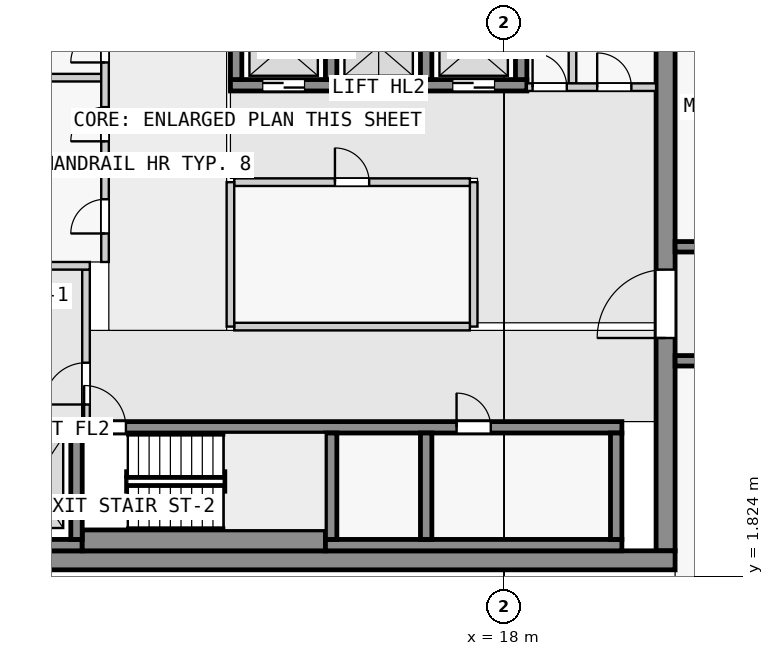
"""IFC4 building model, lengths in metres.
Left out: names, types, materials, properties, quantities, classifications, styles, units other than length and angle.
Written with IfcOpenShell. Run it as: python <this file> out.ifc"""

import sys

from ifc_helpers import new_model, si_unit, direction, frame, frame_2d, origin, place, context, subcontext, project, spatial, rectangle, extrude, element, fill, save


model = new_model("IFC4")
c1 = context("Model", 3, precision=1e-05, world=origin(), true_north=direction((0.0, 1.0)))
c2 = subcontext(c1, "Body", "Model", "MODEL_VIEW")
j1 = project(units=[si_unit("LENGTHUNIT", "METRE"), si_unit("PLANEANGLEUNIT", "RADIAN")], contexts=[c1])
p1 = place(None, origin())
s1 = spatial("IfcSite", under=j1, at=p1, CompositionType="ELEMENT")
p2 = place(p1, origin())
s2 = spatial("IfcBuilding", under=s1, at=p2, CompositionType="ELEMENT")
p3 = place(p2, frame((0.0, 0.0, 222.4)))
s3 = spatial("IfcBuildingStorey", under=s2, at=p3, CompositionType="ELEMENT", Elevation=222.4)
p4 = place(p3, frame((1.8, 2.25, 0.0), z_axis=(0.0, 0.0, 1.0), x_axis=(1.0, 0.0, 0.0)))
e1 = element("IfcWall", 1, at=p4, inside=s3, PredefinedType="SHEAR", context=c2, shape_type="SweptSolid", body=[
    extrude(rectangle(XDim=20.7, YDim=0.5, at=frame_2d((10.35, 0.0))), origin(), (0.0, 0.0, 1.0), 3.25),
])
p5 = place(p3, frame((22.25, 2.5, 0.0), z_axis=(0.0, 0.0, 1.0), x_axis=(0.0, 1.0, 0.0)))
e2 = element("IfcWall", 2, at=p5, inside=s3, PredefinedType="SHEAR", context=c2, shape_type="SweptSolid", body=[
    extrude(rectangle(XDim=15.0, YDim=0.5, at=frame_2d((7.5, 0.0))), origin(), (0.0, 0.0, 1.0), 3.25),
])
p6 = place(p5, frame((5.6, 0.0, 0.0)))
e3 = element("IfcOpeningElement", 3, at=p6, cuts=e2, PredefinedType="OPENING", context=c2, shape_type="SweptSolid", body=[
    extrude(rectangle(XDim=1.8, YDim=2.1, at=frame_2d((0.9, 1.05))), frame((0.0, 0.26, 0.0), z_axis=(0.0, -1.0, 0.0), x_axis=(1.0, 0.0, 0.0)), (0.0, 0.0, 1.0), 0.52),
])
p7 = place(p3, frame((2.3, 2.65, 0.0), z_axis=(0.0, 0.0, 1.0), x_axis=(1.0, 0.0, 0.0)))
e4 = element("IfcWall", 4, at=p7, inside=s3, PredefinedType="SHEAR", context=c2, shape_type="SweptSolid", body=[
    extrude(rectangle(XDim=4.6, YDim=0.3, at=frame_2d((2.3, 0.0))), origin(), (0.0, 0.0, 1.0), 3.25),
])
p8 = place(p3, frame((6.9, 2.775, 0.0), z_axis=(0.0, 0.0, 1.0), x_axis=(1.0, 0.0, 0.0)))
e5 = element("IfcWall", 5, at=p8, inside=s3, PredefinedType="SHEAR", context=c2, shape_type="SweptSolid", body=[
    extrude(rectangle(XDim=6.4, YDim=0.55, at=frame_2d((3.2, 0.0))), origin(), (0.0, 0.0, 1.0), 3.25),
])
p9 = place(p3, frame((13.3, 2.65, 0.0), z_axis=(0.0, 0.0, 1.0), x_axis=(1.0, 0.0, 0.0)))
e6 = element("IfcWall", 6, at=p9, inside=s3, PredefinedType="SHEAR", context=c2, shape_type="SweptSolid", body=[
    extrude(rectangle(XDim=7.8, YDim=0.3, at=frame_2d((3.9, 0.0))), origin(), (0.0, 0.0, 1.0), 3.25),
])
for number, where, z_axis, x_axis in (
    (7, (6.75, 2.8, 0.0), (0.0, 0.0, 1.0), (0.0, 1.0, 0.0)),
    (8, (13.45, 2.8, 0.0), (0.0, 0.0, 1.0), (0.0, 1.0, 0.0)),
    (9, (20.95, 2.8, 0.0), (0.0, 0.0, 1.0), (0.0, 1.0, 0.0)),
):
    element("IfcWall", number, at=place(p3, frame(where, z_axis=z_axis, x_axis=x_axis)), inside=s3, PredefinedType="SHEAR", context=c2, shape_type="SweptSolid", body=[
        extrude(rectangle(XDim=2.8, YDim=0.3, at=frame_2d((1.4, 0.0))), origin(), (0.0, 0.0, 1.0), 3.25),
    ])
p10 = place(p3, frame((2.3, 5.75, 0.0), z_axis=(0.0, 0.0, 1.0), x_axis=(1.0, 0.0, 0.0)))
e10 = element("IfcWall", 10, at=p10, inside=s3, PredefinedType="SHEAR", context=c2, shape_type="SweptSolid", body=[
    extrude(rectangle(XDim=18.8, YDim=0.3, at=frame_2d((9.4, 0.0))), origin(), (0.0, 0.0, 1.0), 3.25),
])
p11 = place(p10, frame((4.65, 0.0, 0.0)))
e11 = element("IfcOpeningElement", 11, at=p11, cuts=e10, PredefinedType="OPENING", context=c2, shape_type="SweptSolid", body=[
    extrude(rectangle(XDim=1.1, YDim=2.1, at=frame_2d((0.55, 1.05))), frame((0.0, 0.16, 0.0), z_axis=(0.0, -1.0, 0.0), x_axis=(1.0, 0.0, 0.0)), (0.0, 0.0, 1.0), 0.32),
])
p12 = place(p10, frame((0.45, 0.0, 0.0)))
e12 = element("IfcOpeningElement", 12, at=p12, cuts=e10, PredefinedType="OPENING", context=c2, shape_type="SweptSolid", body=[
    extrude(rectangle(XDim=1.1, YDim=2.1, at=frame_2d((0.55, 1.05))), frame((0.0, 0.16, 0.0), z_axis=(0.0, -1.0, 0.0), x_axis=(1.0, 0.0, 0.0)), (0.0, 0.0, 1.0), 0.32),
])
p13 = place(p10, frame((2.75, 0.0, 0.0)))
e13 = element("IfcOpeningElement", 13, at=p13, cuts=e10, PredefinedType="OPENING", context=c2, shape_type="SweptSolid", body=[
    extrude(rectangle(XDim=1.1, YDim=2.1, at=frame_2d((0.55, 1.05))), frame((0.0, 0.16, 0.0), z_axis=(0.0, -1.0, 0.0), x_axis=(1.0, 0.0, 0.0)), (0.0, 0.0, 1.0), 0.32),
])
p14 = place(p10, frame((14.45, 0.0, 0.0)))
e14 = element("IfcOpeningElement", 14, at=p14, cuts=e10, PredefinedType="OPENING", context=c2, shape_type="SweptSolid", body=[
    extrude(rectangle(XDim=0.9, YDim=2.1, at=frame_2d((0.45, 1.05))), frame((0.0, 0.16, 0.0), z_axis=(0.0, -1.0, 0.0), x_axis=(1.0, 0.0, 0.0)), (0.0, 0.0, 1.0), 0.32),
])
p15 = place(p3, frame((10.8, 14.75, 0.0), z_axis=(0.0, 0.0, 1.0), x_axis=(1.0, 0.0, 0.0)))
e15 = element("IfcWall", 15, at=p15, inside=s3, PredefinedType="SHEAR", context=c2, shape_type="SweptSolid", body=[
    extrude(rectangle(XDim=7.8, YDim=0.3, at=frame_2d((3.9, 0.0))), origin(), (0.0, 0.0, 1.0), 3.25),
])
p16 = place(p15, frame((0.85, 0.0, 0.0)))
e16 = element("IfcOpeningElement", 16, at=p16, cuts=e15, PredefinedType="OPENING", context=c2, shape_type="SweptSolid", body=[
    extrude(rectangle(XDim=1.1, YDim=2.1, at=frame_2d((0.55, 1.05))), frame((0.0, 0.16, 0.0), z_axis=(0.0, -1.0, 0.0), x_axis=(1.0, 0.0, 0.0)), (0.0, 0.0, 1.0), 0.32),
])
p17 = place(p15, frame((3.35, 0.0, 0.0)))
e17 = element("IfcOpeningElement", 17, at=p17, cuts=e15, PredefinedType="OPENING", context=c2, shape_type="SweptSolid", body=[
    extrude(rectangle(XDim=1.1, YDim=2.1, at=frame_2d((0.55, 1.05))), frame((0.0, 0.16, 0.0), z_axis=(0.0, -1.0, 0.0), x_axis=(1.0, 0.0, 0.0)), (0.0, 0.0, 1.0), 0.32),
])
p18 = place(p15, frame((5.85, 0.0, 0.0)))
e18 = element("IfcOpeningElement", 18, at=p18, cuts=e15, PredefinedType="OPENING", context=c2, shape_type="SweptSolid", body=[
    extrude(rectangle(XDim=1.1, YDim=2.1, at=frame_2d((0.55, 1.05))), frame((0.0, 0.16, 0.0), z_axis=(0.0, -1.0, 0.0), x_axis=(1.0, 0.0, 0.0)), (0.0, 0.0, 1.0), 0.32),
])
for number, where, z_axis, x_axis in (
    (19, (10.95, 14.9, 0.0), (0.0, 0.0, 1.0), (0.0, 1.0, 0.0)),
    (20, (13.45, 14.9, 0.0), (0.0, 0.0, 1.0), (0.0, 1.0, 0.0)),
    (21, (15.95, 14.9, 0.0), (0.0, 0.0, 1.0), (0.0, 1.0, 0.0)),
    (22, (18.45, 14.9, 0.0), (0.0, 0.0, 1.0), (0.0, 1.0, 0.0)),
):
    element("IfcWall", number, at=place(p3, frame(where, z_axis=z_axis, x_axis=x_axis)), inside=s3, PredefinedType="SHEAR", context=c2, shape_type="SweptSolid", body=[
        extrude(rectangle(XDim=2.0, YDim=0.3, at=frame_2d((1.0, 0.0))), origin(), (0.0, 0.0, 1.0), 3.25),
    ])
p19 = place(p3, frame((22.5, 7.5, 0.0), z_axis=(0.0, 0.0, 1.0), x_axis=(1.0, 0.0, 0.0)))
e23 = element("IfcWall", 23, at=p19, inside=s3, PredefinedType="SHEAR", context=c2, shape_type="SweptSolid", body=[
    extrude(rectangle(XDim=22.5, YDim=0.275, at=frame_2d((11.25, 0.0))), origin(), (0.0, 0.0, 1.0), 3.25),
])
p20 = place(p19, frame((1.75, 0.0, 0.0)))
e24 = element("IfcOpeningElement", 24, at=p20, cuts=e23, PredefinedType="OPENING", context=c2, shape_type="SweptSolid", body=[
    extrude(rectangle(XDim=1.0, YDim=2.1, at=frame_2d((0.5, 1.05))), frame((0.0, 0.147, 0.0), z_axis=(0.0, -1.0, 0.0), x_axis=(1.0, 0.0, 0.0)), (0.0, 0.0, 1.0), 0.295),
])
p21 = place(p19, frame((6.25, 0.0, 0.0)))
e25 = element("IfcOpeningElement", 25, at=p21, cuts=e23, PredefinedType="OPENING", context=c2, shape_type="SweptSolid", body=[
    extrude(rectangle(XDim=1.0, YDim=2.1, at=frame_2d((0.5, 1.05))), frame((0.0, 0.147, 0.0), z_axis=(0.0, -1.0, 0.0), x_axis=(1.0, 0.0, 0.0)), (0.0, 0.0, 1.0), 0.295),
])
p22 = place(p19, frame((10.75, 0.0, 0.0)))
e26 = element("IfcOpeningElement", 26, at=p22, cuts=e23, PredefinedType="OPENING", context=c2, shape_type="SweptSolid", body=[
    extrude(rectangle(XDim=1.0, YDim=2.1, at=frame_2d((0.5, 1.05))), frame((0.0, 0.147, 0.0), z_axis=(0.0, -1.0, 0.0), x_axis=(1.0, 0.0, 0.0)), (0.0, 0.0, 1.0), 0.295),
])
p23 = place(p19, frame((16.85, 0.0, 0.0)))
e27 = element("IfcOpeningElement", 27, at=p23, cuts=e23, PredefinedType="OPENING", context=c2, shape_type="SweptSolid", body=[
    extrude(rectangle(XDim=1.0, YDim=2.1, at=frame_2d((0.5, 1.05))), frame((0.0, 0.147, 0.0), z_axis=(0.0, -1.0, 0.0), x_axis=(1.0, 0.0, 0.0)), (0.0, 0.0, 1.0), 0.295),
])
p24 = place(p3, frame((22.5, 10.5, 0.0), z_axis=(0.0, 0.0, 1.0), x_axis=(1.0, 0.0, 0.0)))
e28 = element("IfcWall", 28, at=p24, inside=s3, PredefinedType="SHEAR", context=c2, shape_type="SweptSolid", body=[
    extrude(rectangle(XDim=22.5, YDim=0.275, at=frame_2d((11.25, 0.0))), origin(), (0.0, 0.0, 1.0), 3.25),
])
p25 = place(p24, frame((1.75, 0.0, 0.0)))
e29 = element("IfcOpeningElement", 29, at=p25, cuts=e28, PredefinedType="OPENING", context=c2, shape_type="SweptSolid", body=[
    extrude(rectangle(XDim=1.0, YDim=2.1, at=frame_2d((0.5, 1.05))), frame((0.0, 0.147, 0.0), z_axis=(0.0, -1.0, 0.0), x_axis=(1.0, 0.0, 0.0)), (0.0, 0.0, 1.0), 0.295),
])
p26 = place(p24, frame((6.25, 0.0, 0.0)))
e30 = element("IfcOpeningElement", 30, at=p26, cuts=e28, PredefinedType="OPENING", context=c2, shape_type="SweptSolid", body=[
    extrude(rectangle(XDim=1.0, YDim=2.1, at=frame_2d((0.5, 1.05))), frame((0.0, 0.147, 0.0), z_axis=(0.0, -1.0, 0.0), x_axis=(1.0, 0.0, 0.0)), (0.0, 0.0, 1.0), 0.295),
])
p27 = place(p24, frame((10.35, 0.0, 0.0)))
e31 = element("IfcOpeningElement", 31, at=p27, cuts=e28, PredefinedType="OPENING", context=c2, shape_type="SweptSolid", body=[
    extrude(rectangle(XDim=1.8, YDim=2.1, at=frame_2d((0.9, 1.05))), frame((0.0, 0.147, 0.0), z_axis=(0.0, -1.0, 0.0), x_axis=(1.0, 0.0, 0.0)), (0.0, 0.0, 1.0), 0.295),
])
p28 = place(p24, frame((15.25, 0.0, 0.0)))
e32 = element("IfcOpeningElement", 32, at=p28, cuts=e28, PredefinedType="OPENING", context=c2, shape_type="SweptSolid", body=[
    extrude(rectangle(XDim=1.0, YDim=2.1, at=frame_2d((0.5, 1.05))), frame((0.0, 0.147, 0.0), z_axis=(0.0, -1.0, 0.0), x_axis=(1.0, 0.0, 0.0)), (0.0, 0.0, 1.0), 0.295),
])
p29 = place(p24, frame((18.75, 0.0, 0.0)))
e33 = element("IfcOpeningElement", 33, at=p29, cuts=e28, PredefinedType="OPENING", context=c2, shape_type="SweptSolid", body=[
    extrude(rectangle(XDim=0.9, YDim=2.1, at=frame_2d((0.45, 1.05))), frame((0.0, 0.147, 0.0), z_axis=(0.0, -1.0, 0.0), x_axis=(1.0, 0.0, 0.0)), (0.0, 0.0, 1.0), 0.295),
])
p30 = place(p24, frame((20.95, 0.0, 0.0)))
e34 = element("IfcOpeningElement", 34, at=p30, cuts=e28, PredefinedType="OPENING", context=c2, shape_type="SweptSolid", body=[
    extrude(rectangle(XDim=1.0, YDim=2.1, at=frame_2d((0.5, 1.05))), frame((0.0, 0.147, 0.0), z_axis=(0.0, -1.0, 0.0), x_axis=(1.0, 0.0, 0.0)), (0.0, 0.0, 1.0), 0.295),
])
p31 = place(p3, frame((7.0, 5.9, 0.0), z_axis=(0.0, 0.0, 1.0), x_axis=(0.0, 1.0, 0.0)))
e35 = element("IfcWall", 35, at=p31, inside=s3, PredefinedType="PARTITIONING", context=c2, shape_type="SweptSolid", body=[
    extrude(rectangle(XDim=4.0, YDim=0.2, at=frame_2d((2.0, 0.0))), origin(), (0.0, 0.0, 1.0), 3.25),
])
p32 = place(p31, frame((0.45, 0.0, 0.0)))
e36 = element("IfcOpeningElement", 36, at=p32, cuts=e35, PredefinedType="OPENING", context=c2, shape_type="SweptSolid", body=[
    extrude(rectangle(XDim=1.1, YDim=2.1, at=frame_2d((0.55, 1.05))), frame((0.0, 0.11, 0.0), z_axis=(0.0, -1.0, 0.0), x_axis=(1.0, 0.0, 0.0)), (0.0, 0.0, 1.0), 0.22),
])
p33 = place(p3, frame((5.15, 10.0, 0.0), z_axis=(0.0, 0.0, 1.0), x_axis=(1.0, 0.0, 0.0)))
e37 = element("IfcWall", 37, at=p33, inside=s3, PredefinedType="PARTITIONING", context=c2, shape_type="SweptSolid", body=[
    extrude(rectangle(XDim=1.95, YDim=0.2, at=frame_2d((0.975, 0.0))), origin(), (0.0, 0.0, 1.0), 3.25),
])
p34 = place(p3, frame((10.8, 8.4, 0.0), z_axis=(0.0, 0.0, 1.0), x_axis=(0.0, 1.0, 0.0)))
e38 = element("IfcWall", 38, at=p34, inside=s3, PredefinedType="PARTITIONING", context=c2, shape_type="SweptSolid", body=[
    extrude(rectangle(XDim=3.8, YDim=0.2, at=frame_2d((1.9, 0.0))), origin(), (0.0, 0.0, 1.0), 3.25),
])
p35 = place(p3, frame((10.9, 8.4, 0.0), z_axis=(0.0, 0.0, 1.0), x_axis=(1.0, 0.0, 0.0)))
e39 = element("IfcWall", 39, at=p35, inside=s3, PredefinedType="PARTITIONING", context=c2, shape_type="SweptSolid", body=[
    extrude(rectangle(XDim=6.2, YDim=0.2, at=frame_2d((3.1, 0.0))), origin(), (0.0, 0.0, 1.0), 3.25),
])
p36 = place(p3, frame((17.2, 8.4, 0.0), z_axis=(0.0, 0.0, 1.0), x_axis=(0.0, 1.0, 0.0)))
e40 = element("IfcWall", 40, at=p36, inside=s3, PredefinedType="PARTITIONING", context=c2, shape_type="SweptSolid", body=[
    extrude(rectangle(XDim=3.8, YDim=0.2, at=frame_2d((1.9, 0.0))), origin(), (0.0, 0.0, 1.0), 3.25),
])
p37 = place(p3, frame((10.9, 12.2, 0.0), z_axis=(0.0, 0.0, 1.0), x_axis=(1.0, 0.0, 0.0)))
e41 = element("IfcWall", 41, at=p37, inside=s3, PredefinedType="PARTITIONING", context=c2, shape_type="SweptSolid", body=[
    extrude(rectangle(XDim=6.2, YDim=0.2, at=frame_2d((3.1, 0.0))), origin(), (0.0, 0.0, 1.0), 3.25),
])
p38 = place(p37, frame((2.65, 0.0, 0.0)))
e42 = element("IfcOpeningElement", 42, at=p38, cuts=e41, PredefinedType="OPENING", context=c2, shape_type="SweptSolid", body=[
    extrude(rectangle(XDim=0.9, YDim=2.1, at=frame_2d((0.45, 1.05))), frame((0.0, 0.11, 0.0), z_axis=(0.0, -1.0, 0.0), x_axis=(1.0, 0.0, 0.0)), (0.0, 0.0, 1.0), 0.22),
])
p39 = place(p3, frame((7.5, 10.1, 0.0), z_axis=(0.0, 0.0, 1.0), x_axis=(0.0, 1.0, 0.0)))
e43 = element("IfcWall", 43, at=p39, inside=s3, PredefinedType="PARTITIONING", context=c2, shape_type="SweptSolid", body=[
    extrude(rectangle(XDim=7.4, YDim=0.2, at=frame_2d((3.7, 0.0))), origin(), (0.0, 0.0, 1.0), 3.25),
])
p40 = place(p39, frame((0.75, 0.0, 0.0)))
e44 = element("IfcOpeningElement", 44, at=p40, cuts=e43, PredefinedType="OPENING", context=c2, shape_type="SweptSolid", body=[
    extrude(rectangle(XDim=0.9, YDim=2.1, at=frame_2d((0.45, 1.05))), frame((0.0, 0.11, 0.0), z_axis=(0.0, -1.0, 0.0), x_axis=(1.0, 0.0, 0.0)), (0.0, 0.0, 1.0), 0.22),
])
p41 = place(p39, frame((3.175, 0.0, 0.0)))
e45 = element("IfcOpeningElement", 45, at=p41, cuts=e43, PredefinedType="OPENING", context=c2, shape_type="SweptSolid", body=[
    extrude(rectangle(XDim=0.9, YDim=2.1, at=frame_2d((0.45, 1.05))), frame((0.0, 0.11, 0.0), z_axis=(0.0, -1.0, 0.0), x_axis=(1.0, 0.0, 0.0)), (0.0, 0.0, 1.0), 0.22),
])
p42 = place(p39, frame((5.25, 0.0, 0.0)))
e46 = element("IfcOpeningElement", 46, at=p42, cuts=e43, PredefinedType="OPENING", context=c2, shape_type="SweptSolid", body=[
    extrude(rectangle(XDim=0.9, YDim=2.1, at=frame_2d((0.45, 1.05))), frame((0.0, 0.11, 0.0), z_axis=(0.0, -1.0, 0.0), x_axis=(1.0, 0.0, 0.0)), (0.0, 0.0, 1.0), 0.22),
])
for number, where, z_axis, x_axis in (
    (47, (5.15, 12.5, 0.0), (0.0, 0.0, 1.0), (1.0, 0.0, 0.0)),
    (48, (5.15, 14.95, 0.0), (0.0, 0.0, 1.0), (1.0, 0.0, 0.0)),
):
    element("IfcWall", number, at=place(p3, frame(where, z_axis=z_axis, x_axis=x_axis)), inside=s3, PredefinedType="PARTITIONING", context=c2, shape_type="SweptSolid", body=[
        extrude(rectangle(XDim=2.25, YDim=0.2, at=frame_2d((1.125, 0.0))), origin(), (0.0, 0.0, 1.0), 3.25),
    ])
p43 = place(p3, frame((18.6, 14.7, 0.0), z_axis=(0.0, 0.0, 1.0), x_axis=(1.0, 0.0, 0.0)))
e49 = element("IfcWall", 49, at=p43, inside=s3, PredefinedType="PARTITIONING", context=c2, shape_type="SweptSolid", body=[
    extrude(rectangle(XDim=3.4, YDim=0.2, at=frame_2d((1.7, 0.0))), origin(), (0.0, 0.0, 1.0), 3.25),
])
p44 = place(p43, frame((0.15, 0.0, 0.0)))
e50 = element("IfcOpeningElement", 50, at=p44, cuts=e49, PredefinedType="OPENING", context=c2, shape_type="SweptSolid", body=[
    extrude(rectangle(XDim=0.9, YDim=2.1, at=frame_2d((0.45, 1.05))), frame((0.0, 0.11, 0.0), z_axis=(0.0, -1.0, 0.0), x_axis=(1.0, 0.0, 0.0)), (0.0, 0.0, 1.0), 0.22),
])
p45 = place(p43, frame((1.85, 0.0, 0.0)))
e51 = element("IfcOpeningElement", 51, at=p45, cuts=e49, PredefinedType="OPENING", context=c2, shape_type="SweptSolid", body=[
    extrude(rectangle(XDim=0.9, YDim=2.1, at=frame_2d((0.45, 1.05))), frame((0.0, 0.11, 0.0), z_axis=(0.0, -1.0, 0.0), x_axis=(1.0, 0.0, 0.0)), (0.0, 0.0, 1.0), 0.22),
])
p46 = place(p3, frame((19.8, 14.8, 0.0), z_axis=(0.0, 0.0, 1.0), x_axis=(0.0, 1.0, 0.0)))
e52 = element("IfcWall", 52, at=p46, inside=s3, PredefinedType="PARTITIONING", context=c2, shape_type="SweptSolid", body=[
    extrude(rectangle(XDim=2.7, YDim=0.2, at=frame_2d((1.35, 0.0))), origin(), (0.0, 0.0, 1.0), 3.25),
])
p47 = place(p3, frame((15.95, 2.8, 0.0), z_axis=(0.0, 0.0, 1.0), x_axis=(0.0, 1.0, 0.0)))
e53 = element("IfcWall", 53, at=p47, inside=s3, PredefinedType="SHEAR", context=c2, shape_type="SweptSolid", body=[
    extrude(rectangle(XDim=2.8, YDim=0.3, at=frame_2d((1.4, 0.0))), origin(), (0.0, 0.0, 1.0), 3.25),
])
p48 = place(p32, origin())
e54 = element("IfcDoor", 54, at=p48, inside=s3, OperationType="SINGLE_SWING_LEFT", PredefinedType="DOOR", context=c2, shape_type="SweptSolid", body=[
    extrude(rectangle(XDim=1.1, YDim=2.1, at=frame_2d((0.55, 1.05))), frame((0.0, 0.025, 0.0), z_axis=(0.0, -1.0, 0.0), x_axis=(1.0, 0.0, 0.0)), (0.0, 0.0, 1.0), 0.05),
])
fill(e36, e54)
p49 = place(p38, origin())
e55 = element("IfcDoor", 55, at=p49, inside=s3, OperationType="SINGLE_SWING_LEFT", PredefinedType="DOOR", context=c2, shape_type="SweptSolid", body=[
    extrude(rectangle(XDim=0.9, YDim=2.1, at=frame_2d((0.45, 1.05))), frame((0.0, 0.025, 0.0), z_axis=(0.0, -1.0, 0.0), x_axis=(1.0, 0.0, 0.0)), (0.0, 0.0, 1.0), 0.05),
])
fill(e42, e55)
p50 = place(p11, origin())
e56 = element("IfcDoor", 56, at=p50, inside=s3, OperationType="SINGLE_SWING_LEFT", PredefinedType="DOOR", context=c2, shape_type="SweptSolid", body=[
    extrude(rectangle(XDim=1.1, YDim=2.1, at=frame_2d((0.55, 1.05))), frame((0.0, 0.025, 0.0), z_axis=(0.0, -1.0, 0.0), x_axis=(1.0, 0.0, 0.0)), (0.0, 0.0, 1.0), 0.05),
])
fill(e11, e56)
p51 = place(p13, origin())
e57 = element("IfcDoor", 57, at=p51, inside=s3, OperationType="DOUBLE_DOOR_SLIDING", PredefinedType="DOOR", context=c2, shape_type="SweptSolid", body=[
    extrude(rectangle(XDim=1.1, YDim=2.1, at=frame_2d((0.55, 1.05))), frame((0.0, 0.025, 0.0), z_axis=(0.0, -1.0, 0.0), x_axis=(1.0, 0.0, 0.0)), (0.0, 0.0, 1.0), 0.05),
])
fill(e13, e57)
p52 = place(p16, origin())
e58 = element("IfcDoor", 58, at=p52, inside=s3, OperationType="DOUBLE_DOOR_SLIDING", PredefinedType="DOOR", context=c2, shape_type="SweptSolid", body=[
    extrude(rectangle(XDim=1.1, YDim=2.1, at=frame_2d((0.55, 1.05))), frame((0.0, 0.025, 0.0), z_axis=(0.0, -1.0, 0.0), x_axis=(1.0, 0.0, 0.0)), (0.0, 0.0, 1.0), 0.05),
])
fill(e16, e58)
p53 = place(p17, origin())
e59 = element("IfcDoor", 59, at=p53, inside=s3, OperationType="DOUBLE_DOOR_SLIDING", PredefinedType="DOOR", context=c2, shape_type="SweptSolid", body=[
    extrude(rectangle(XDim=1.1, YDim=2.1, at=frame_2d((0.55, 1.05))), frame((0.0, 0.025, 0.0), z_axis=(0.0, -1.0, 0.0), x_axis=(1.0, 0.0, 0.0)), (0.0, 0.0, 1.0), 0.05),
])
fill(e17, e59)
p54 = place(p18, origin())
e60 = element("IfcDoor", 60, at=p54, inside=s3, OperationType="DOUBLE_DOOR_SLIDING", PredefinedType="DOOR", context=c2, shape_type="SweptSolid", body=[
    extrude(rectangle(XDim=1.1, YDim=2.1, at=frame_2d((0.55, 1.05))), frame((0.0, 0.025, 0.0), z_axis=(0.0, -1.0, 0.0), x_axis=(1.0, 0.0, 0.0)), (0.0, 0.0, 1.0), 0.05),
])
fill(e18, e60)
p55 = place(p6, origin())
e61 = element("IfcDoor", 61, at=p55, inside=s3, OperationType="DOUBLE_DOOR_SINGLE_SWING", PredefinedType="DOOR", context=c2, shape_type="SweptSolid", body=[
    extrude(rectangle(XDim=1.8, YDim=2.1, at=frame_2d((0.9, 1.05))), frame((0.0, 0.025, 0.0), z_axis=(0.0, -1.0, 0.0), x_axis=(1.0, 0.0, 0.0)), (0.0, 0.0, 1.0), 0.05),
])
fill(e3, e61)
p56 = place(p40, origin())
e62 = element("IfcDoor", 62, at=p56, inside=s3, OperationType="SINGLE_SWING_RIGHT", PredefinedType="DOOR", context=c2, shape_type="SweptSolid", body=[
    extrude(rectangle(XDim=0.9, YDim=2.1, at=frame_2d((0.45, 1.05))), frame((0.0, 0.025, 0.0), z_axis=(0.0, -1.0, 0.0), x_axis=(1.0, 0.0, 0.0)), (0.0, 0.0, 1.0), 0.05),
])
fill(e44, e62)
p57 = place(p41, origin())
e63 = element("IfcDoor", 63, at=p57, inside=s3, OperationType="SINGLE_SWING_RIGHT", PredefinedType="DOOR", context=c2, shape_type="SweptSolid", body=[
    extrude(rectangle(XDim=0.9, YDim=2.1, at=frame_2d((0.45, 1.05))), frame((0.0, 0.025, 0.0), z_axis=(0.0, -1.0, 0.0), x_axis=(1.0, 0.0, 0.0)), (0.0, 0.0, 1.0), 0.05),
])
fill(e45, e63)
p58 = place(p42, origin())
e64 = element("IfcDoor", 64, at=p58, inside=s3, OperationType="SINGLE_SWING_RIGHT", PredefinedType="DOOR", context=c2, shape_type="SweptSolid", body=[
    extrude(rectangle(XDim=0.9, YDim=2.1, at=frame_2d((0.45, 1.05))), frame((0.0, 0.025, 0.0), z_axis=(0.0, -1.0, 0.0), x_axis=(1.0, 0.0, 0.0)), (0.0, 0.0, 1.0), 0.05),
])
fill(e46, e64)
p59 = place(p44, origin())
e65 = element("IfcDoor", 65, at=p59, inside=s3, OperationType="SINGLE_SWING_LEFT", PredefinedType="DOOR", context=c2, shape_type="SweptSolid", body=[
    extrude(rectangle(XDim=0.9, YDim=2.1, at=frame_2d((0.45, 1.05))), frame((0.0, 0.025, 0.0), z_axis=(0.0, -1.0, 0.0), x_axis=(1.0, 0.0, 0.0)), (0.0, 0.0, 1.0), 0.05),
])
fill(e50, e65)
p60 = place(p45, origin())
e66 = element("IfcDoor", 66, at=p60, inside=s3, OperationType="SINGLE_SWING_LEFT", PredefinedType="DOOR", context=c2, shape_type="SweptSolid", body=[
    extrude(rectangle(XDim=0.9, YDim=2.1, at=frame_2d((0.45, 1.05))), frame((0.0, 0.025, 0.0), z_axis=(0.0, -1.0, 0.0), x_axis=(1.0, 0.0, 0.0)), (0.0, 0.0, 1.0), 0.05),
])
fill(e51, e66)
p61 = place(p14, origin())
e67 = element("IfcDoor", 67, at=p61, inside=s3, OperationType="SINGLE_SWING_LEFT", PredefinedType="DOOR", context=c2, shape_type="SweptSolid", body=[
    extrude(rectangle(XDim=0.9, YDim=2.1, at=frame_2d((0.45, 1.05))), frame((0.0, 0.025, 0.0), z_axis=(0.0, -1.0, 0.0), x_axis=(1.0, 0.0, 0.0)), (0.0, 0.0, 1.0), 0.05),
])
fill(e14, e67)
save(model, sys.argv[1])
